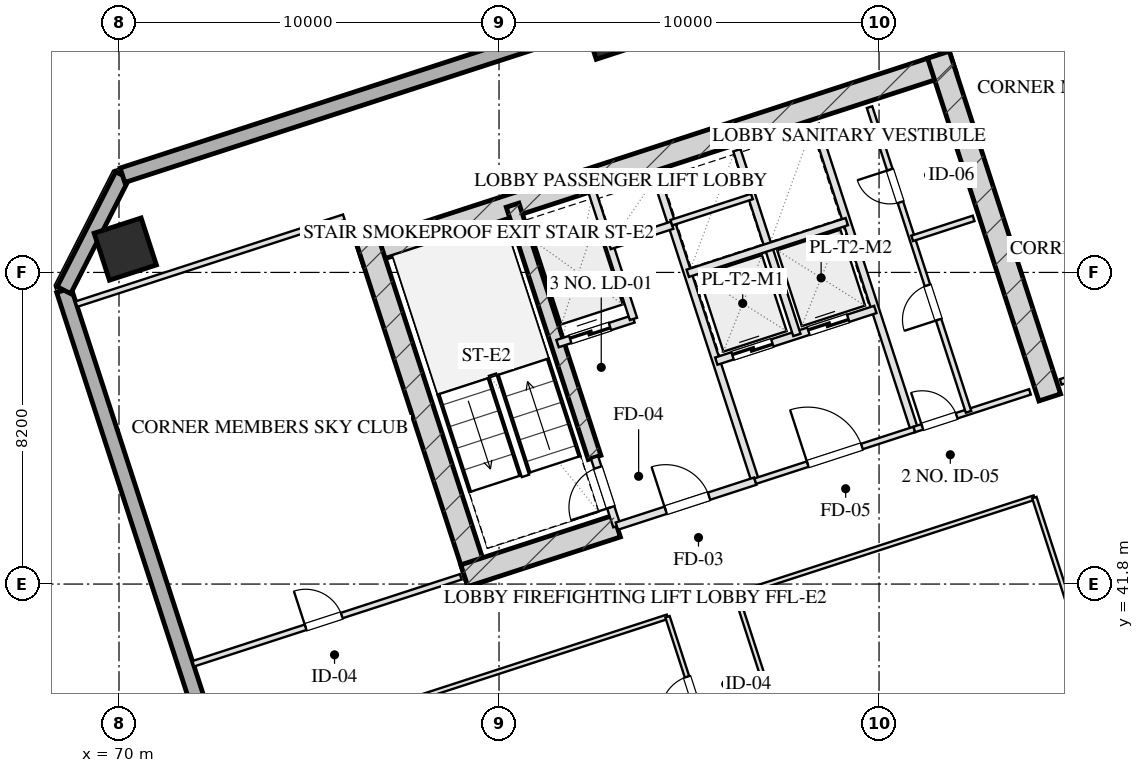
"""IFC4 building model, lengths in metres.
Left out: names, types, materials, properties, quantities, classifications, styles, units other than length and angle.
Written with IfcOpenShell. Run it as: python <this file> out.ifc"""

import sys

from ifc_helpers import new_model, si_unit, direction, frame, frame_2d, origin, origin_2d, place, context, subcontext, project, spatial, rectangle, hollow_rectangle, extrude, element, fill, save


model = new_model("IFC4")
c1 = context("Model", 3, precision=1e-05, world=origin(), true_north=direction((0.0, 1.0)))
c2 = subcontext(c1, "Body", "Model", "MODEL_VIEW")
j1 = project(units=[si_unit("LENGTHUNIT", "METRE"), si_unit("PLANEANGLEUNIT", "RADIAN")], contexts=[c1])
p1 = place(None, origin())
s1 = spatial("IfcSite", under=j1, at=p1, CompositionType="ELEMENT")
p2 = place(p1, origin())
s2 = spatial("IfcBuilding", under=s1, at=p2, CompositionType="ELEMENT")
p3 = place(p2, frame((0.0, 0.0, 156.4)))
s3 = spatial("IfcBuildingStorey", under=s2, at=p3, CompositionType="ELEMENT", Elevation=156.4)
p4 = place(p3, frame((76.344, 50.466, 0.0), z_axis=(0.0, 0.0, 1.0), x_axis=(0.951055727519, 0.309019421968, 0.0)))
e1 = element("IfcWall", 1, at=p4, inside=s3, PredefinedType="SHEAR", context=c2, shape_type="SweptSolid", body=[
    extrude(rectangle(XDim=16.4, YDim=0.6, at=frame_2d((8.2, 0.0))), origin(), (0.0, 0.0, 1.0), 3.45),
])
for number, where, z_axis, x_axis in (
    (2, (79.466, 41.828, 0.0), (0.0, 0.0, 1.0), (-0.309, 0.951, 0.0)),
    (3, (94.492, 46.71, 0.0), (0.0, 0.0, 1.0), (-0.309, 0.951, 0.0)),
):
    element("IfcWall", number, at=place(p3, frame(where, z_axis=z_axis, x_axis=x_axis)), inside=s3, PredefinedType="SHEAR", context=c2, shape_type="SweptSolid", body=[
        extrude(rectangle(XDim=9.48, YDim=0.6, at=frame_2d((4.74, 0.0))), origin(), (0.0, 0.0, 1.0), 3.45),
    ])
p5 = place(p3, frame((82.514, 45.131, 0.0), z_axis=(0.0, 0.0, 1.0), x_axis=(-0.308988790936, 0.951065679686, 0.0)))
e4 = element("IfcWall", 4, at=p5, inside=s3, PredefinedType="SHEAR", context=c2, shape_type="SweptSolid", body=[
    extrude(rectangle(XDim=6.98, YDim=0.35, at=frame_2d((3.49, 0.0))), origin(), (0.0, 0.0, 1.0), 3.45),
])
p6 = place(p3, frame((79.087, 42.021, 0.0), z_axis=(0.0, 0.0, 1.0), x_axis=(0.951062550203, 0.3089984233, 0.0)))
e5 = element("IfcWall", 5, at=p6, inside=s3, PredefinedType="SHEAR", context=c2, shape_type="SweptSolid", body=[
    extrude(rectangle(XDim=4.22, YDim=0.6, at=frame_2d((2.11, 0.0))), origin(), (0.0, 0.0, 1.0), 3.45),
])
p7 = place(p3, frame((70.165, 50.614, 0.0), z_axis=(0.0, 0.0, 1.0), x_axis=(0.951056516295, 0.309016994375, 0.0)))
e6 = element("IfcColumn", 6, at=p7, inside=s3, PredefinedType="COLUMN", context=c2, shape_type="SweptSolid", body=[
    extrude(hollow_rectangle(XDim=1.3, YDim=1.3, WallThickness=0.045, at=origin_2d()), origin(), (0.0, 0.0, 1.0), 3.451),
])
p8 = place(p3, frame((82.815, 56.112, 0.0), z_axis=(0.0, 0.0, 1.0), x_axis=(0.951056516295, 0.309016994375, 0.0)))
e7 = element("IfcColumn", 7, at=p8, inside=s3, PredefinedType="COLUMN", context=c2, shape_type="SweptSolid", body=[
    extrude(hollow_rectangle(XDim=0.8, YDim=0.8, WallThickness=0.028, at=origin_2d()), origin(), (0.0, 0.0, 1.0), 3.451),
])
p9 = place(p3, frame((81.776, 8.827, 0.0), z_axis=(0.0, 0.0, 1.0), x_axis=(-0.309014228706, 0.951057414911, 0.0)))
e8 = element("IfcWall", 8, at=p9, inside=s3, PredefinedType="SOLIDWALL", context=c2, shape_type="SweptSolid", body=[
    extrude(rectangle(XDim=42.8, YDim=0.4, at=frame_2d((21.4, 0.0))), origin(), (0.0, 0.0, 1.0), 2.61),
])
p10 = place(p9, frame((13.875, 0.0, 0.75)))
e9 = element("IfcOpeningElement", 9, at=p10, cuts=e8, PredefinedType="OPENING", context=c2, shape_type="SweptSolid", body=[
    extrude(rectangle(XDim=2.25, YDim=1.46, at=frame_2d((1.125, 0.73))), frame((0.0, 0.21, 0.0), z_axis=(0.0, -1.0, 0.0), x_axis=(1.0, 0.0, 0.0)), (0.0, 0.0, 1.0), 0.42),
])
p11 = place(p9, frame((26.65, 0.0, 0.0)))
e10 = element("IfcOpeningElement", 10, at=p11, cuts=e8, PredefinedType="OPENING", context=c2, shape_type="SweptSolid", body=[
    extrude(rectangle(XDim=1.1, YDim=2.15, at=frame_2d((0.55, 1.075))), frame((0.0, 0.21, 0.0), z_axis=(0.0, -1.0, 0.0), x_axis=(1.0, 0.0, 0.0)), (0.0, 0.0, 1.0), 0.42),
])
p12 = place(p3, frame((68.551, 49.532, 0.0), z_axis=(0.0, 0.0, 1.0), x_axis=(0.454019523198, 0.890991735402, 0.0)))
e11 = element("IfcWall", 11, at=p12, inside=s3, PredefinedType="SOLIDWALL", context=c2, shape_type="SweptSolid", body=[
    extrude(rectangle(XDim=3.394, YDim=0.4, at=frame_2d((1.697, 0.0))), origin(), (0.0, 0.0, 1.0), 2.61),
])
p13 = place(p3, frame((70.092, 52.556, 0.0), z_axis=(0.0, 0.0, 1.0), x_axis=(0.951057580055, 0.30901372044, 0.0)))
e12 = element("IfcWall", 12, at=p13, inside=s3, PredefinedType="SOLIDWALL", context=c2, shape_type="SweptSolid", body=[
    extrude(rectangle(XDim=26.4, YDim=0.4, at=frame_2d((13.2, 0.0))), origin(), (0.0, 0.0, 1.0), 2.61),
])
p14 = place(p3, frame((83.101, 43.324, 0.0), z_axis=(0.0, 0.0, 1.0), x_axis=(-0.309048298632, 0.951046344356, 0.0)))
e13 = element("IfcWall", 13, at=p14, inside=s3, PredefinedType="PARTITIONING", context=c2, shape_type="SweptSolid", body=[
    extrude(rectangle(XDim=1.9, YDim=0.2, at=frame_2d((0.95, 0.0))), origin(), (0.0, 0.0, 1.0), 3.175),
])
p15 = place(p14, frame((0.52, 0.0, 0.0)))
e14 = element("IfcOpeningElement", 14, at=p15, cuts=e13, PredefinedType="OPENING", context=c2, shape_type="SweptSolid", body=[
    extrude(rectangle(XDim=1.1, YDim=2.05, at=frame_2d((0.55, 1.025))), frame((0.0, 0.11, 0.0), z_axis=(0.0, -1.0, 0.0), x_axis=(1.0, 0.0, 0.0)), (0.0, 0.0, 1.0), 0.22),
])
p16 = place(p3, frame((86.743, 44.508, 0.0), z_axis=(0.0, 0.0, 1.0), x_axis=(-0.309016001439, 0.951056838919, 0.0)))
e15 = element("IfcWall", 15, at=p16, inside=s3, PredefinedType="PARTITIONING", context=c2, shape_type="SweptSolid", body=[
    extrude(rectangle(XDim=8.43, YDim=0.2, at=frame_2d((4.215, 0.0))), origin(), (0.0, 0.0, 1.0), 3.175),
])
p17 = place(p3, frame((83.101, 43.324, 0.0), z_axis=(0.0, 0.0, 1.0), x_axis=(0.951052804469, 0.309028417967, 0.0)))
e16 = element("IfcWall", 16, at=p17, inside=s3, PredefinedType="PARTITIONING", context=c2, shape_type="SweptSolid", body=[
    extrude(rectangle(XDim=3.83, YDim=0.2, at=frame_2d((1.915, 0.0))), origin(), (0.0, 0.0, 1.0), 3.175),
])
p18 = place(p17, frame((1.35, 0.0, 0.0)))
e17 = element("IfcOpeningElement", 17, at=p18, cuts=e16, PredefinedType="OPENING", context=c2, shape_type="SweptSolid", body=[
    extrude(rectangle(XDim=1.2, YDim=2.05, at=frame_2d((0.6, 1.025))), frame((0.0, 0.11, 0.0), z_axis=(0.0, -1.0, 0.0), x_axis=(1.0, 0.0, 0.0)), (0.0, 0.0, 1.0), 0.22),
])
p19 = place(p3, frame((81.54, 48.127, 0.0), z_axis=(0.0, 0.0, 1.0), x_axis=(0.951062257173, 0.308999325213, 0.0)))
e18 = element("IfcWall", 18, at=p19, inside=s3, PredefinedType="PARTITIONING", context=c2, shape_type="SweptSolid", body=[
    extrude(rectangle(XDim=2.1, YDim=0.2, at=frame_2d((1.05, 0.0))), origin(), (0.0, 0.0, 1.0), 3.175),
])
p20 = place(p19, frame((0.35, 0.0, 0.0)))
e19 = element("IfcOpeningElement", 19, at=p20, cuts=e18, PredefinedType="OPENING", context=c2, shape_type="SweptSolid", body=[
    extrude(rectangle(XDim=1.1, YDim=2.05, at=frame_2d((0.55, 1.025))), frame((0.0, 0.11, 0.0), z_axis=(0.0, -1.0, 0.0), x_axis=(1.0, 0.0, 0.0)), (0.0, 0.0, 1.0), 0.22),
])
p21 = place(p3, frame((83.538, 48.776, 0.0), z_axis=(0.0, 0.0, 1.0), x_axis=(-0.3089935693, 0.951064127245, 0.0)))
e20 = element("IfcWall", 20, at=p21, inside=s3, PredefinedType="PARTITIONING", context=c2, shape_type="SweptSolid", body=[
    extrude(rectangle(XDim=3.7, YDim=0.2, at=frame_2d((1.85, 0.0))), origin(), (0.0, 0.0, 1.0), 3.175),
])
p22 = place(p3, frame((82.91, 50.707, 0.0), z_axis=(0.0, 0.0, 1.0), x_axis=(0.951041328149, 0.309063734775, 0.0)))
e21 = element("IfcWall", 21, at=p22, inside=s3, PredefinedType="PARTITIONING", context=c2, shape_type="SweptSolid", body=[
    extrude(rectangle(XDim=1.73, YDim=0.2, at=frame_2d((0.865, 0.0))), origin(), (0.0, 0.0, 1.0), 3.175),
])
p23 = place(p3, frame((90.928, 45.868, 0.0), z_axis=(0.0, 0.0, 1.0), x_axis=(-0.309042196757, 0.951048327176, 0.0)))
e22 = element("IfcWall", 22, at=p23, inside=s3, PredefinedType="PARTITIONING", context=c2, shape_type="SweptSolid", body=[
    extrude(rectangle(XDim=8.43, YDim=0.2, at=frame_2d((4.215, 0.0))), origin(), (0.0, 0.0, 1.0), 3.175),
])
p24 = place(p3, frame((86.743, 44.508, 0.0), z_axis=(0.0, 0.0, 1.0), x_axis=(0.951063829732, 0.308994485023, 0.0)))
e23 = element("IfcWall", 23, at=p24, inside=s3, PredefinedType="PARTITIONING", context=c2, shape_type="SweptSolid", body=[
    extrude(rectangle(XDim=4.4, YDim=0.15, at=frame_2d((2.2, 0.0))), origin(), (0.0, 0.0, 1.0), 3.175),
])
p25 = place(p24, frame((1.45, 0.0, 0.0)))
e24 = element("IfcOpeningElement", 24, at=p25, cuts=e23, PredefinedType="OPENING", context=c2, shape_type="SweptSolid", body=[
    extrude(rectangle(XDim=1.5, YDim=2.05, at=frame_2d((0.75, 1.025))), frame((0.0, 0.085, 0.0), z_axis=(0.0, -1.0, 0.0), x_axis=(1.0, 0.0, 0.0)), (0.0, 0.0, 1.0), 0.17),
])
p26 = place(p3, frame((85.718, 47.666, 0.0), z_axis=(0.0, 0.0, 1.0), x_axis=(0.951058531764, 0.30901079133, 0.0)))
e25 = element("IfcWall", 25, at=p26, inside=s3, PredefinedType="PARTITIONING", context=c2, shape_type="SweptSolid", body=[
    extrude(rectangle(XDim=4.4, YDim=0.2, at=frame_2d((2.2, 0.0))), origin(), (0.0, 0.0, 1.0), 3.175),
])
p27 = place(p26, frame((0.45, 0.0, 0.0)))
e26 = element("IfcOpeningElement", 26, at=p27, cuts=e25, PredefinedType="OPENING", context=c2, shape_type="SweptSolid", body=[
    extrude(rectangle(XDim=1.1, YDim=2.05, at=frame_2d((0.55, 1.025))), frame((0.0, 0.11, 0.0), z_axis=(0.0, -1.0, 0.0), x_axis=(1.0, 0.0, 0.0)), (0.0, 0.0, 1.0), 0.22),
])
p28 = place(p26, frame((2.55, 0.0, 0.0)))
e27 = element("IfcOpeningElement", 27, at=p28, cuts=e25, PredefinedType="OPENING", context=c2, shape_type="SweptSolid", body=[
    extrude(rectangle(XDim=1.1, YDim=2.05, at=frame_2d((0.55, 1.025))), frame((0.0, 0.11, 0.0), z_axis=(0.0, -1.0, 0.0), x_axis=(1.0, 0.0, 0.0)), (0.0, 0.0, 1.0), 0.22),
])
p29 = place(p3, frame((87.838, 48.354, 0.0), z_axis=(0.0, 0.0, 1.0), x_axis=(-0.3090093719, 0.951058992953, 0.0)))
e28 = element("IfcWall", 28, at=p29, inside=s3, PredefinedType="PARTITIONING", context=c2, shape_type="SweptSolid", body=[
    extrude(rectangle(XDim=5.11, YDim=0.2, at=frame_2d((2.555, 0.0))), origin(), (0.0, 0.0, 1.0), 3.175),
])
p30 = place(p3, frame((84.967, 49.977, 0.0), z_axis=(0.0, 0.0, 1.0), x_axis=(0.951063829732, 0.308994485023, 0.0)))
e29 = element("IfcWall", 29, at=p30, inside=s3, PredefinedType="PARTITIONING", context=c2, shape_type="SweptSolid", body=[
    extrude(rectangle(XDim=4.4, YDim=0.2, at=frame_2d((2.2, 0.0))), origin(), (0.0, 0.0, 1.0), 3.175),
])
p31 = place(p3, frame((84.534, 51.308, 0.0), z_axis=(0.0, 0.0, 1.0), x_axis=(0.951075093106, 0.308959814982, 0.0)))
e30 = element("IfcWall", 30, at=p31, inside=s3, PredefinedType="PARTITIONING", context=c2, shape_type="SweptSolid", body=[
    extrude(rectangle(XDim=2.23, YDim=0.15, at=frame_2d((1.115, 0.0))), origin(), (0.0, 0.0, 1.0), 3.175),
])
p32 = place(p3, frame((90.928, 45.868, 0.0), z_axis=(0.0, 0.0, 1.0), x_axis=(0.951059297078, 0.309008435874, 0.0)))
e31 = element("IfcWall", 31, at=p32, inside=s3, PredefinedType="PARTITIONING", context=c2, shape_type="SweptSolid", body=[
    extrude(rectangle(XDim=3.2, YDim=0.15, at=frame_2d((1.6, 0.0))), origin(), (0.0, 0.0, 1.0), 3.175),
])
p33 = place(p32, frame((0.22, 0.0, 0.0)))
e32 = element("IfcOpeningElement", 32, at=p33, cuts=e31, PredefinedType="OPENING", context=c2, shape_type="SweptSolid", body=[
    extrude(rectangle(XDim=0.95, YDim=2.05, at=frame_2d((0.475, 1.025))), frame((0.0, 0.085, 0.0), z_axis=(0.0, -1.0, 0.0), x_axis=(1.0, 0.0, 0.0)), (0.0, 0.0, 1.0), 0.17),
])
p34 = place(p3, frame((92.355, 46.331, 0.0), z_axis=(0.0, 0.0, 1.0), x_axis=(-0.309007490203, 0.951059604335, 0.0)))
e33 = element("IfcWall", 33, at=p34, inside=s3, PredefinedType="PARTITIONING", context=c2, shape_type="SweptSolid", body=[
    extrude(rectangle(XDim=8.43, YDim=0.15, at=frame_2d((4.215, 0.0))), origin(), (0.0, 0.0, 1.0), 3.175),
])
p35 = place(p34, frame((2.55, 0.0, 0.0)))
e34 = element("IfcOpeningElement", 34, at=p35, cuts=e33, PredefinedType="OPENING", context=c2, shape_type="SweptSolid", body=[
    extrude(rectangle(XDim=0.95, YDim=2.05, at=frame_2d((0.475, 1.025))), frame((0.0, 0.085, 0.0), z_axis=(0.0, -1.0, 0.0), x_axis=(1.0, 0.0, 0.0)), (0.0, 0.0, 1.0), 0.17),
])
p36 = place(p34, frame((5.8, 0.0, 0.0)))
e35 = element("IfcOpeningElement", 35, at=p36, cuts=e33, PredefinedType="OPENING", context=c2, shape_type="SweptSolid", body=[
    extrude(rectangle(XDim=0.9, YDim=2.05, at=frame_2d((0.45, 1.025))), frame((0.0, 0.085, 0.0), z_axis=(0.0, -1.0, 0.0), x_axis=(1.0, 0.0, 0.0)), (0.0, 0.0, 1.0), 0.17),
])
p37 = place(p3, frame((90.871, 50.896, 0.0), z_axis=(0.0, 0.0, 1.0), x_axis=(0.951054116971, 0.309024378638, 0.0)))
e36 = element("IfcWall", 36, at=p37, inside=s3, PredefinedType="PARTITIONING", context=c2, shape_type="SweptSolid", body=[
    extrude(rectangle(XDim=1.7, YDim=0.15, at=frame_2d((0.85, 0.0))), origin(), (0.0, 0.0, 1.0), 3.175),
])
p38 = place(p3, frame((68.88, 49.166, 0.0), z_axis=(0.0, 0.0, 1.0), x_axis=(0.951060977215, 0.309003264738, 0.0)))
e37 = element("IfcWall", 37, at=p38, inside=s3, PredefinedType="PARTITIONING", context=c2, shape_type="SweptSolid", body=[
    extrude(rectangle(XDim=7.4, YDim=0.15, at=frame_2d((3.7, 0.0))), origin(), (0.0, 0.0, 1.0), 3.175),
])
p39 = place(p3, frame((71.955, 39.703, 0.0), z_axis=(0.0, 0.0, 1.0), x_axis=(0.951060977215, 0.309003264738, 0.0)))
e38 = element("IfcWall", 38, at=p39, inside=s3, PredefinedType="PARTITIONING", context=c2, shape_type="SweptSolid", body=[
    extrude(rectangle(XDim=7.4, YDim=0.15, at=frame_2d((3.7, 0.0))), origin(), (0.0, 0.0, 1.0), 3.175),
])
p40 = place(p39, frame((3.108, 0.0, 0.0)))
e39 = element("IfcOpeningElement", 39, at=p40, cuts=e38, PredefinedType="OPENING", context=c2, shape_type="SweptSolid", body=[
    extrude(rectangle(XDim=1.0, YDim=2.05, at=frame_2d((0.5, 1.025))), frame((0.0, 0.085, 0.0), z_axis=(0.0, -1.0, 0.0), x_axis=(1.0, 0.0, 0.0)), (0.0, 0.0, 1.0), 0.17),
])
p41 = place(p3, frame((94.78, 47.119, 0.0), z_axis=(0.0, 0.0, 1.0), x_axis=(0.951057811516, 0.309013008068, 0.0)))
e40 = element("IfcWall", 40, at=p41, inside=s3, PredefinedType="PARTITIONING", context=c2, shape_type="SweptSolid", body=[
    extrude(rectangle(XDim=6.8, YDim=0.15, at=frame_2d((3.4, 0.0))), origin(), (0.0, 0.0, 1.0), 3.175),
])
p42 = place(p41, frame((2.856, 0.0, 0.0)))
e41 = element("IfcOpeningElement", 41, at=p42, cuts=e40, PredefinedType="OPENING", context=c2, shape_type="SweptSolid", body=[
    extrude(rectangle(XDim=1.0, YDim=2.05, at=frame_2d((0.5, 1.025))), frame((0.0, 0.085, 0.0), z_axis=(0.0, -1.0, 0.0), x_axis=(1.0, 0.0, 0.0)), (0.0, 0.0, 1.0), 0.17),
])
p43 = place(p3, frame((72.783, 37.154, 0.0), z_axis=(0.0, 0.0, 1.0), x_axis=(0.9510516424, 0.30903199428, 0.0)))
e42 = element("IfcWall", 42, at=p43, inside=s3, PredefinedType="PARTITIONING", context=c2, shape_type="SweptSolid", body=[
    extrude(rectangle(XDim=12.25, YDim=0.12, at=frame_2d((6.125, 0.0))), origin(), (0.0, 0.0, 1.0), 3.175),
])
p44 = place(p3, frame((86.24, 41.527, 0.0), z_axis=(0.0, 0.0, 1.0), x_axis=(0.951058857521, 0.309009788731, 0.0)))
e43 = element("IfcWall", 43, at=p44, inside=s3, PredefinedType="PARTITIONING", context=c2, shape_type="SweptSolid", body=[
    extrude(rectangle(XDim=8.25, YDim=0.12, at=frame_2d((4.125, 0.0))), origin(), (0.0, 0.0, 1.0), 3.175),
])
p45 = place(p3, frame((89.575, 25.114, 0.0), z_axis=(0.0, 0.0, 1.0), x_axis=(-0.30901773025, 0.951056277195, 0.0)))
e44 = element("IfcWall", 44, at=p45, inside=s3, PredefinedType="PARTITIONING", context=c2, shape_type="SweptSolid", body=[
    extrude(rectangle(XDim=16.64, YDim=0.12, at=frame_2d((8.32, 0.0))), origin(), (0.0, 0.0, 1.0), 3.175),
])
p46 = place(p45, frame((1.66, 0.0, 0.0)))
e45 = element("IfcOpeningElement", 45, at=p46, cuts=e44, PredefinedType="OPENING", context=c2, shape_type="SweptSolid", body=[
    extrude(rectangle(XDim=1.0, YDim=2.05, at=frame_2d((0.5, 1.025))), frame((0.0, 0.07, 0.0), z_axis=(0.0, -1.0, 0.0), x_axis=(1.0, 0.0, 0.0)), (0.0, 0.0, 1.0), 0.14),
])
p47 = place(p45, frame((7.82, 0.0, 0.0)))
e46 = element("IfcOpeningElement", 46, at=p47, cuts=e44, PredefinedType="OPENING", context=c2, shape_type="SweptSolid", body=[
    extrude(rectangle(XDim=1.05, YDim=2.05, at=frame_2d((0.525, 1.025))), frame((0.0, 0.07, 0.0), z_axis=(0.0, -1.0, 0.0), x_axis=(1.0, 0.0, 0.0)), (0.0, 0.0, 1.0), 0.14),
])
p48 = place(p45, frame((13.98, 0.0, 0.0)))
e47 = element("IfcOpeningElement", 47, at=p48, cuts=e44, PredefinedType="OPENING", context=c2, shape_type="SweptSolid", body=[
    extrude(rectangle(XDim=1.0, YDim=2.05, at=frame_2d((0.5, 1.025))), frame((0.0, 0.07, 0.0), z_axis=(0.0, -1.0, 0.0), x_axis=(1.0, 0.0, 0.0)), (0.0, 0.0, 1.0), 0.14),
])
p49 = place(p3, frame((91.382, 25.701, 0.0), z_axis=(0.0, 0.0, 1.0), x_axis=(-0.309004459387, 0.951060589068, 0.0)))
e48 = element("IfcWall", 48, at=p49, inside=s3, PredefinedType="PARTITIONING", context=c2, shape_type="SweptSolid", body=[
    extrude(rectangle(XDim=16.64, YDim=0.12, at=frame_2d((8.32, 0.0))), origin(), (0.0, 0.0, 1.0), 3.175),
])
p50 = place(p49, frame((7.987, 0.0, 0.0)))
e49 = element("IfcOpeningElement", 49, at=p50, cuts=e48, PredefinedType="OPENING", context=c2, shape_type="SweptSolid", body=[
    extrude(rectangle(XDim=1.1, YDim=2.05, at=frame_2d((0.55, 1.025))), frame((0.0, 0.07, 0.0), z_axis=(0.0, -1.0, 0.0), x_axis=(1.0, 0.0, 0.0)), (0.0, 0.0, 1.0), 0.14),
])
p51 = place(p3, frame((99.229, 28.25, 0.0), z_axis=(0.0, 0.0, 1.0), x_axis=(-0.30901773025, 0.951056277195, 0.0)))
e50 = element("IfcWall", 50, at=p51, inside=s3, PredefinedType="PARTITIONING", context=c2, shape_type="SweptSolid", body=[
    extrude(rectangle(XDim=16.64, YDim=0.12, at=frame_2d((8.32, 0.0))), origin(), (0.0, 0.0, 1.0), 3.175),
])
p52 = place(p15, origin())
e51 = element("IfcDoor", 51, at=p52, inside=s3, OperationType="SINGLE_SWING_LEFT", PredefinedType="DOOR", context=c2, shape_type="SweptSolid", body=[
    extrude(rectangle(XDim=1.1, YDim=2.05, at=frame_2d((0.55, 1.025))), frame((0.0, 0.025, 0.0), z_axis=(0.0, -1.0, 0.0), x_axis=(1.0, 0.0, 0.0)), (0.0, 0.0, 1.0), 0.05),
])
fill(e14, e51)
p53 = place(p18, origin())
e52 = element("IfcDoor", 52, at=p53, inside=s3, OperationType="SINGLE_SWING_LEFT", PredefinedType="DOOR", context=c2, shape_type="SweptSolid", body=[
    extrude(rectangle(XDim=1.2, YDim=2.05, at=frame_2d((0.6, 1.025))), frame((0.0, 0.025, 0.0), z_axis=(0.0, -1.0, 0.0), x_axis=(1.0, 0.0, 0.0)), (0.0, 0.0, 1.0), 0.05),
])
fill(e17, e52)
p54 = place(p20, origin())
e53 = element("IfcDoor", 53, at=p54, inside=s3, OperationType="DOUBLE_DOOR_SLIDING", PredefinedType="DOOR", context=c2, shape_type="SweptSolid", body=[
    extrude(rectangle(XDim=1.1, YDim=2.05, at=frame_2d((0.55, 1.025))), frame((0.0, 0.025, 0.0), z_axis=(0.0, -1.0, 0.0), x_axis=(1.0, 0.0, 0.0)), (0.0, 0.0, 1.0), 0.05),
])
fill(e19, e53)
p55 = place(p25, origin())
e54 = element("IfcDoor", 54, at=p55, inside=s3, OperationType="SINGLE_SWING_LEFT", PredefinedType="DOOR", context=c2, shape_type="SweptSolid", body=[
    extrude(rectangle(XDim=1.5, YDim=2.05, at=frame_2d((0.75, 1.025))), frame((0.0, 0.025, 0.0), z_axis=(0.0, -1.0, 0.0), x_axis=(1.0, 0.0, 0.0)), (0.0, 0.0, 1.0), 0.05),
])
fill(e24, e54)
p56 = place(p27, origin())
e55 = element("IfcDoor", 55, at=p56, inside=s3, OperationType="DOUBLE_DOOR_SLIDING", PredefinedType="DOOR", context=c2, shape_type="SweptSolid", body=[
    extrude(rectangle(XDim=1.1, YDim=2.05, at=frame_2d((0.55, 1.025))), frame((0.0, 0.025, 0.0), z_axis=(0.0, -1.0, 0.0), x_axis=(1.0, 0.0, 0.0)), (0.0, 0.0, 1.0), 0.05),
])
fill(e26, e55)
p57 = place(p28, origin())
e56 = element("IfcDoor", 56, at=p57, inside=s3, OperationType="DOUBLE_DOOR_SLIDING", PredefinedType="DOOR", context=c2, shape_type="SweptSolid", body=[
    extrude(rectangle(XDim=1.1, YDim=2.05, at=frame_2d((0.55, 1.025))), frame((0.0, 0.025, 0.0), z_axis=(0.0, -1.0, 0.0), x_axis=(1.0, 0.0, 0.0)), (0.0, 0.0, 1.0), 0.05),
])
fill(e27, e56)
p58 = place(p33, origin())
e57 = element("IfcDoor", 57, at=p58, inside=s3, OperationType="SINGLE_SWING_LEFT", PredefinedType="DOOR", context=c2, shape_type="SweptSolid", body=[
    extrude(rectangle(XDim=0.95, YDim=2.05, at=frame_2d((0.475, 1.025))), frame((0.0, 0.025, 0.0), z_axis=(0.0, -1.0, 0.0), x_axis=(1.0, 0.0, 0.0)), (0.0, 0.0, 1.0), 0.05),
])
fill(e32, e57)
p59 = place(p35, origin())
e58 = element("IfcDoor", 58, at=p59, inside=s3, OperationType="SINGLE_SWING_LEFT", PredefinedType="DOOR", context=c2, shape_type="SweptSolid", body=[
    extrude(rectangle(XDim=0.95, YDim=2.05, at=frame_2d((0.475, 1.025))), frame((0.0, 0.025, 0.0), z_axis=(0.0, -1.0, 0.0), x_axis=(1.0, 0.0, 0.0)), (0.0, 0.0, 1.0), 0.05),
])
fill(e34, e58)
p60 = place(p36, origin())
e59 = element("IfcDoor", 59, at=p60, inside=s3, OperationType="SINGLE_SWING_RIGHT", PredefinedType="DOOR", context=c2, shape_type="SweptSolid", body=[
    extrude(rectangle(XDim=0.9, YDim=2.05, at=frame_2d((0.45, 1.025))), frame((0.0, 0.025, 0.0), z_axis=(0.0, -1.0, 0.0), x_axis=(1.0, 0.0, 0.0)), (0.0, 0.0, 1.0), 0.05),
])
fill(e35, e59)
p61 = place(p40, origin())
e60 = element("IfcDoor", 60, at=p61, inside=s3, OperationType="SINGLE_SWING_LEFT", PredefinedType="DOOR", context=c2, shape_type="SweptSolid", body=[
    extrude(rectangle(XDim=1.0, YDim=2.05, at=frame_2d((0.5, 1.025))), frame((0.0, 0.025, 0.0), z_axis=(0.0, -1.0, 0.0), x_axis=(1.0, 0.0, 0.0)), (0.0, 0.0, 1.0), 0.05),
])
fill(e39, e60)
p62 = place(p48, origin())
e61 = element("IfcDoor", 61, at=p62, inside=s3, OperationType="SINGLE_SWING_LEFT", PredefinedType="DOOR", context=c2, shape_type="SweptSolid", body=[
    extrude(rectangle(XDim=1.0, YDim=2.05, at=frame_2d((0.5, 1.025))), frame((0.0, 0.025, 0.0), z_axis=(0.0, -1.0, 0.0), x_axis=(1.0, 0.0, 0.0)), (0.0, 0.0, 1.0), 0.05),
])
fill(e47, e61)
save(model, sys.argv[1])
